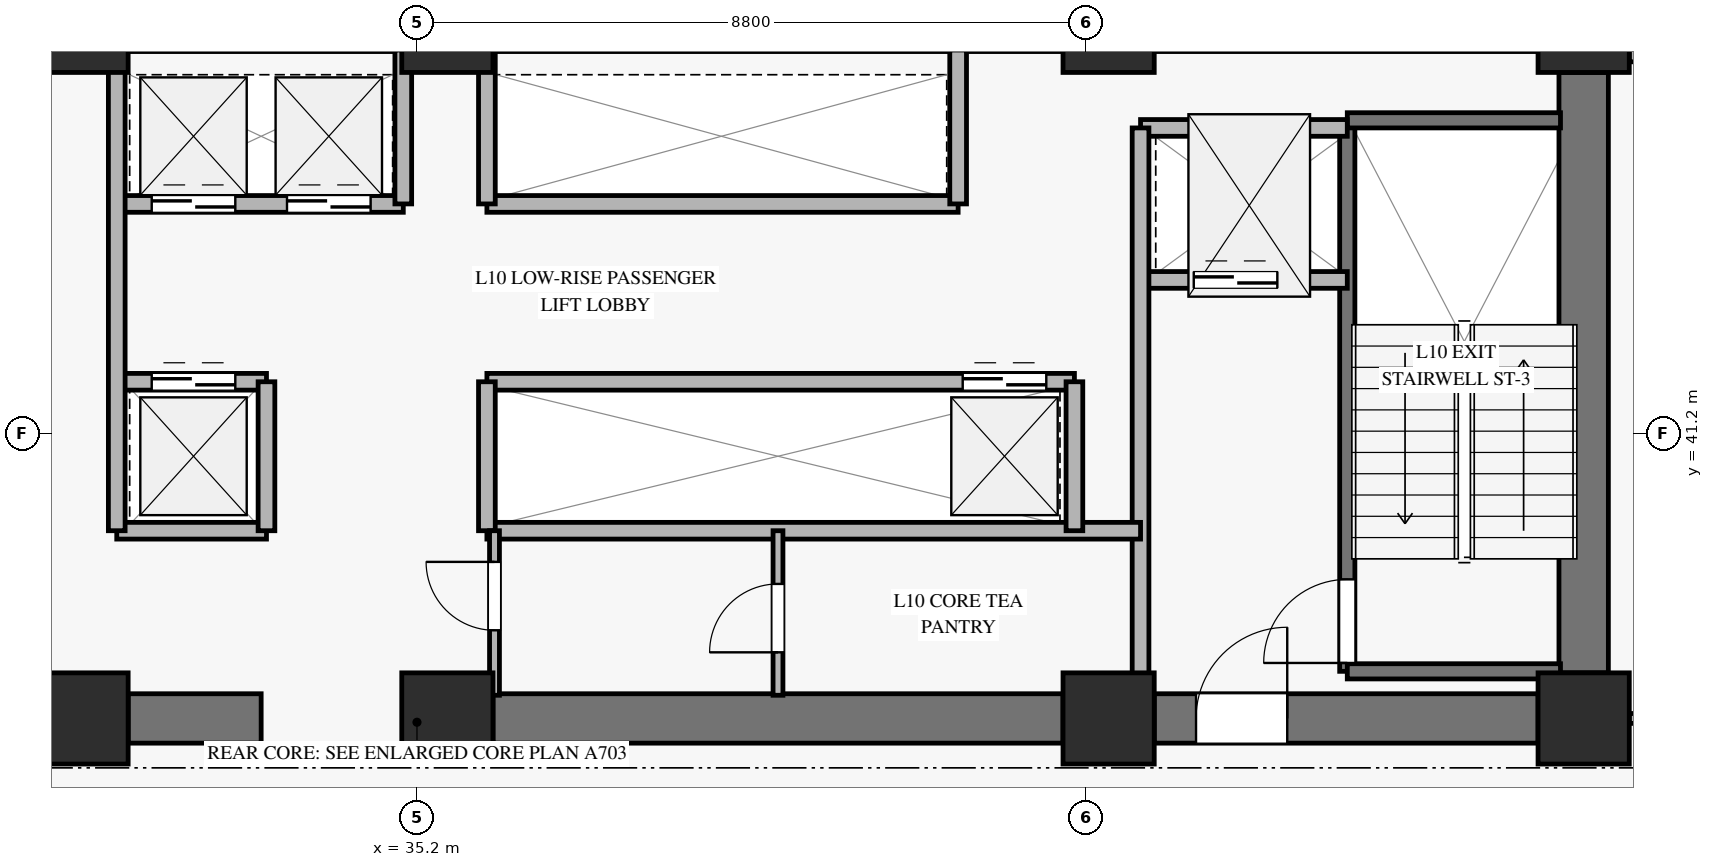
"""IFC4 building model, lengths in metres.
Left out: names, types, materials, properties, quantities, classifications, styles, units other than length and angle.
Written with IfcOpenShell. Run it as: python <this file> out.ifc"""

import sys

from ifc_helpers import new_model, si_unit, direction, frame, frame_2d, origin, origin_2d, place, context, subcontext, project, spatial, rectangle, extrude, source, transform, mapped, element, fill, save


model = new_model("IFC4")
c1 = context("Model", 3, precision=1e-05, world=origin(), true_north=direction((0.0, 1.0)))
c2 = subcontext(c1, "Body", "Model", "MODEL_VIEW")
j1 = project(units=[si_unit("LENGTHUNIT", "METRE"), si_unit("PLANEANGLEUNIT", "RADIAN")], contexts=[c1])
p1 = place(None, origin())
s1 = spatial("IfcSite", under=j1, at=p1, CompositionType="ELEMENT")
p2 = place(p1, origin())
s2 = spatial("IfcBuilding", under=s1, at=p2, CompositionType="ELEMENT")
p3 = place(p2, frame((0.0, 0.0, 41.0)))
s3 = spatial("IfcBuildingStorey", under=s2, at=p3, CompositionType="ELEMENT", Elevation=41.0)
m1 = source(origin(), c2, "Body", "SweptSolid", [
    extrude(rectangle(XDim=1.2, YDim=1.2, at=origin_2d()), origin(), (0.0, 0.0, 1.0), 3.68),
])
for number, where, z_axis, x_axis in (
    (1, (30.8, 37.45, 0.0), (0.0, 0.0, 1.0), (1.0, 0.0, 0.0)),
    (2, (30.8, 46.55, 0.0), (0.0, 0.0, 1.0), (1.0, 0.0, 0.0)),
    (3, (35.6, 37.45, 0.0), (0.0, 0.0, 1.0), (1.0, 0.0, 0.0)),
    (4, (35.6, 46.55, 0.0), (0.0, 0.0, 1.0), (1.0, 0.0, 0.0)),
    (5, (44.3, 37.45, 0.0), (0.0, 0.0, 1.0), (1.0, 0.0, 0.0)),
    (6, (44.3, 46.55, 0.0), (0.0, 0.0, 1.0), (1.0, 0.0, 0.0)),
    (7, (50.55, 37.45, 0.0), (0.0, 0.0, 1.0), (1.0, 0.0, 0.0)),
    (8, (50.55, 46.55, 0.0), (0.0, 0.0, 1.0), (1.0, 0.0, 0.0)),
):
    element("IfcColumn", number, at=place(p3, frame(where, z_axis=z_axis, x_axis=x_axis)), inside=s3, PredefinedType="PILASTER", context=c2, shape_type="MappedRepresentation", body=[
        mapped(m1, transform((0.0, 0.0, 0.0), x_axis=(1.0, 0.0, 0.0), y_axis=(0.0, 1.0, 0.0), z_axis=(0.0, 0.0, 1.0), scale=1.0)),
    ])
p4 = place(p3, frame((31.4, 37.45, 0.0), z_axis=(0.0, 0.0, 1.0), x_axis=(1.0, 0.0, 0.0)))
e9 = element("IfcWall", 9, at=p4, inside=s3, PredefinedType="SHEAR", context=c2, shape_type="SweptSolid", body=[
    extrude(rectangle(XDim=1.75, YDim=0.65, at=frame_2d((0.875, 0.0))), origin(), (0.0, 0.0, 1.0), 3.68),
])
p5 = place(p3, frame((36.2, 37.45, 0.0), z_axis=(0.0, 0.0, 1.0), x_axis=(1.0, 0.0, 0.0)))
e10 = element("IfcWall", 10, at=p5, inside=s3, PredefinedType="SHEAR", context=c2, shape_type="SweptSolid", body=[
    extrude(rectangle(XDim=7.5, YDim=0.65, at=frame_2d((3.75, 0.0))), origin(), (0.0, 0.0, 1.0), 3.68),
])
p6 = place(p3, frame((44.9, 37.45, 0.0), z_axis=(0.0, 0.0, 1.0), x_axis=(1.0, 0.0, 0.0)))
e11 = element("IfcWall", 11, at=p6, inside=s3, PredefinedType="SHEAR", context=c2, shape_type="SweptSolid", body=[
    extrude(rectangle(XDim=5.05, YDim=0.65, at=frame_2d((2.525, 0.0))), origin(), (0.0, 0.0, 1.0), 3.68),
])
p7 = place(p6, frame((0.55, 0.0, 0.0)))
e12 = element("IfcOpeningElement", 12, at=p7, cuts=e11, PredefinedType="OPENING", context=c2, shape_type="SweptSolid", body=[
    extrude(rectangle(XDim=1.2, YDim=2.15, at=frame_2d((0.6, 1.075))), frame((0.0, 0.335, 0.0), z_axis=(0.0, -1.0, 0.0), x_axis=(1.0, 0.0, 0.0)), (0.0, 0.0, 1.0), 0.67),
])
p8 = place(p3, frame((50.55, 38.05, 0.0), z_axis=(0.0, 0.0, 1.0), x_axis=(0.0, 1.0, 0.0)))
e13 = element("IfcWall", 13, at=p8, inside=s3, PredefinedType="SHEAR", context=c2, shape_type="SweptSolid", body=[
    extrude(rectangle(XDim=7.9, YDim=0.65, at=frame_2d((3.95, 0.0))), origin(), (0.0, 0.0, 1.0), 3.68),
])
p9 = place(p3, frame((51.15, 46.25, 0.0), z_axis=(0.0, 0.0, 1.0), x_axis=(1.0, 0.0, 0.0)))
e14 = element("IfcWall", 14, at=p9, inside=s3, PredefinedType="SOLIDWALL", context=c2, shape_type="SweptSolid", body=[
    extrude(rectangle(XDim=12.191, YDim=0.32, at=frame_2d((6.096, 0.0))), origin(), (0.0, 0.0, 1.0), 3.16),
])
p10 = place(p9, frame((5.296, 0.0, 0.45)))
e15 = element("IfcOpeningElement", 15, at=p10, cuts=e14, PredefinedType="OPENING", context=c2, shape_type="SweptSolid", body=[
    extrude(rectangle(XDim=1.6, YDim=2.0, at=frame_2d((0.8, 1.0))), frame((0.0, 0.17, 0.0), z_axis=(0.0, -1.0, 0.0), x_axis=(1.0, 0.0, 0.0)), (0.0, 0.0, 1.0), 0.34),
])
p11 = place(p3, frame((47.44, 38.07, 0.0), z_axis=(0.0, 0.0, 1.0), x_axis=(0.0, 1.0, 0.0)))
e16 = element("IfcWall", 16, at=p11, inside=s3, PredefinedType="SOLIDWALL", context=c2, shape_type="SweptSolid", body=[
    extrude(rectangle(XDim=7.25, YDim=0.2, at=frame_2d((3.625, 0.0))), origin(), (0.0, 0.0, 1.0), 3.9),
])
p12 = place(p11, frame((0.11, 0.0, 0.0)))
e17 = element("IfcOpeningElement", 17, at=p12, cuts=e16, PredefinedType="OPENING", context=c2, shape_type="SweptSolid", body=[
    extrude(rectangle(XDim=1.1, YDim=2.15, at=frame_2d((0.55, 1.075))), frame((0.0, 0.11, 0.0), z_axis=(0.0, -1.0, 0.0), x_axis=(1.0, 0.0, 0.0)), (0.0, 0.0, 1.0), 0.22),
])
for number, where, z_axis, x_axis in (
    (18, (47.44, 45.32, 0.0), (0.0, 0.0, 1.0), (1.0, 0.0, 0.0)),
    (19, (47.44, 38.07, 0.0), (0.0, 0.0, 1.0), (1.0, 0.0, 0.0)),
):
    element("IfcWall", number, at=place(p3, frame(where, z_axis=z_axis, x_axis=x_axis)), inside=s3, PredefinedType="SOLIDWALL", context=c2, shape_type="SweptSolid", body=[
        extrude(rectangle(XDim=2.805, YDim=0.2, at=frame_2d((1.403, 0.0))), origin(), (0.0, 0.0, 1.0), 3.9),
    ])
p13 = place(p3, frame((44.72, 43.22, 0.0), z_axis=(0.0, 0.0, 1.0), x_axis=(1.0, 0.0, 0.0)))
e20 = element("IfcWall", 20, at=p13, inside=s3, PredefinedType="SOLIDWALL", context=c2, shape_type="SweptSolid", body=[
    extrude(rectangle(XDim=2.72, YDim=0.22, at=frame_2d((1.36, 0.0))), origin(), (0.0, 0.0, 1.0), 3.68),
])
p14 = place(p13, frame((0.7, 0.0, 0.0)))
e21 = element("IfcOpeningElement", 21, at=p14, cuts=e20, PredefinedType="OPENING", context=c2, shape_type="SweptSolid", body=[
    extrude(rectangle(XDim=1.1, YDim=2.2, at=frame_2d((0.55, 1.1))), frame((0.0, 0.12, 0.0), z_axis=(0.0, -1.0, 0.0), x_axis=(1.0, 0.0, 0.0)), (0.0, 0.0, 1.0), 0.24),
])
p15 = place(p3, frame((44.72, 45.22, 0.0), z_axis=(0.0, 0.0, 1.0), x_axis=(1.0, 0.0, 0.0)))
e22 = element("IfcWall", 22, at=p15, inside=s3, PredefinedType="SOLIDWALL", context=c2, shape_type="SweptSolid", body=[
    extrude(rectangle(XDim=2.72, YDim=0.22, at=frame_2d((1.36, 0.0))), origin(), (0.0, 0.0, 1.0), 3.68),
])
p16 = place(p3, frame((44.72, 37.755, 0.0), z_axis=(0.0, 0.0, 1.0), x_axis=(0.0, 1.0, 0.0)))
e23 = element("IfcWall", 23, at=p16, inside=s3, PredefinedType="SOLIDWALL", context=c2, shape_type="SweptSolid", body=[
    extrude(rectangle(XDim=7.465, YDim=0.22, at=frame_2d((3.732, 0.0))), origin(), (0.0, 0.0, 1.0), 3.68),
])
p17 = place(p3, frame((31.25, 44.22, 0.0), z_axis=(0.0, 0.0, 1.0), x_axis=(1.0, 0.0, 0.0)))
e24 = element("IfcWall", 24, at=p17, inside=s3, PredefinedType="SOLIDWALL", context=c2, shape_type="SweptSolid", body=[
    extrude(rectangle(XDim=3.77, YDim=0.22, at=frame_2d((1.885, 0.0))), origin(), (0.0, 0.0, 1.0), 3.68),
])
p18 = place(p17, frame((0.46, 0.0, 0.0)))
e25 = element("IfcOpeningElement", 25, at=p18, cuts=e24, PredefinedType="OPENING", context=c2, shape_type="SweptSolid", body=[
    extrude(rectangle(XDim=1.1, YDim=2.2, at=frame_2d((0.55, 1.1))), frame((0.0, 0.12, 0.0), z_axis=(0.0, -1.0, 0.0), x_axis=(1.0, 0.0, 0.0)), (0.0, 0.0, 1.0), 0.24),
])
p19 = place(p17, frame((2.24, 0.0, 0.0)))
e26 = element("IfcOpeningElement", 26, at=p19, cuts=e24, PredefinedType="OPENING", context=c2, shape_type="SweptSolid", body=[
    extrude(rectangle(XDim=1.1, YDim=2.2, at=frame_2d((0.55, 1.1))), frame((0.0, 0.12, 0.0), z_axis=(0.0, -1.0, 0.0), x_axis=(1.0, 0.0, 0.0)), (0.0, 0.0, 1.0), 0.24),
])
p20 = place(p3, frame((36.12, 44.22, 0.0), z_axis=(0.0, 0.0, 1.0), x_axis=(1.0, 0.0, 0.0)))
e27 = element("IfcWall", 27, at=p20, inside=s3, PredefinedType="SOLIDWALL", context=c2, shape_type="SweptSolid", body=[
    extrude(rectangle(XDim=6.2, YDim=0.22, at=frame_2d((3.1, 0.0))), origin(), (0.0, 0.0, 1.0), 3.68),
])
for number, where, z_axis, x_axis in (
    (28, (35.02, 44.22, 0.0), (0.0, 0.0, 1.0), (0.0, 1.0, 0.0)),
    (29, (36.12, 44.22, 0.0), (0.0, 0.0, 1.0), (0.0, 1.0, 0.0)),
    (30, (42.32, 44.22, 0.0), (0.0, 0.0, 1.0), (0.0, 1.0, 0.0)),
):
    element("IfcWall", number, at=place(p3, frame(where, z_axis=z_axis, x_axis=x_axis)), inside=s3, PredefinedType="SOLIDWALL", context=c2, shape_type="SweptSolid", body=[
        extrude(rectangle(XDim=2.025, YDim=0.22, at=frame_2d((1.013, 0.0))), origin(), (0.0, 0.0, 1.0), 3.68),
    ])
p21 = place(p3, frame((31.25, 41.88, 0.0), z_axis=(0.0, 0.0, 1.0), x_axis=(1.0, 0.0, 0.0)))
e31 = element("IfcWall", 31, at=p21, inside=s3, PredefinedType="SOLIDWALL", context=c2, shape_type="SweptSolid", body=[
    extrude(rectangle(XDim=1.97, YDim=0.22, at=frame_2d((0.985, 0.0))), origin(), (0.0, 0.0, 1.0), 3.68),
])
p22 = place(p21, frame((0.46, 0.0, 0.0)))
e32 = element("IfcOpeningElement", 32, at=p22, cuts=e31, PredefinedType="OPENING", context=c2, shape_type="SweptSolid", body=[
    extrude(rectangle(XDim=1.1, YDim=2.2, at=frame_2d((0.55, 1.1))), frame((0.0, 0.12, 0.0), z_axis=(0.0, -1.0, 0.0), x_axis=(1.0, 0.0, 0.0)), (0.0, 0.0, 1.0), 0.24),
])
p23 = place(p3, frame((36.12, 41.88, 0.0), z_axis=(0.0, 0.0, 1.0), x_axis=(1.0, 0.0, 0.0)))
e33 = element("IfcWall", 33, at=p23, inside=s3, PredefinedType="SOLIDWALL", context=c2, shape_type="SweptSolid", body=[
    extrude(rectangle(XDim=7.73, YDim=0.22, at=frame_2d((3.865, 0.0))), origin(), (0.0, 0.0, 1.0), 3.68),
])
p24 = place(p23, frame((6.26, 0.0, 0.0)))
e34 = element("IfcOpeningElement", 34, at=p24, cuts=e33, PredefinedType="OPENING", context=c2, shape_type="SweptSolid", body=[
    extrude(rectangle(XDim=1.1, YDim=2.2, at=frame_2d((0.55, 1.1))), frame((0.0, 0.12, 0.0), z_axis=(0.0, -1.0, 0.0), x_axis=(1.0, 0.0, 0.0)), (0.0, 0.0, 1.0), 0.24),
])
p25 = place(p3, frame((31.25, 39.92, 0.0), z_axis=(0.0, 0.0, 1.0), x_axis=(1.0, 0.0, 0.0)))
e35 = element("IfcWall", 35, at=p25, inside=s3, PredefinedType="SOLIDWALL", context=c2, shape_type="SweptSolid", body=[
    extrude(rectangle(XDim=1.97, YDim=0.22, at=frame_2d((0.985, 0.0))), origin(), (0.0, 0.0, 1.0), 3.68),
])
p26 = place(p3, frame((33.22, 39.92, 0.0), z_axis=(0.0, 0.0, 1.0), x_axis=(0.0, 1.0, 0.0)))
e36 = element("IfcWall", 36, at=p26, inside=s3, PredefinedType="SOLIDWALL", context=c2, shape_type="SweptSolid", body=[
    extrude(rectangle(XDim=1.96, YDim=0.22, at=frame_2d((0.98, 0.0))), origin(), (0.0, 0.0, 1.0), 3.68),
])
p27 = place(p3, frame((36.12, 39.92, 0.0), z_axis=(0.0, 0.0, 1.0), x_axis=(1.0, 0.0, 0.0)))
e37 = element("IfcWall", 37, at=p27, inside=s3, PredefinedType="SOLIDWALL", context=c2, shape_type="SweptSolid", body=[
    extrude(rectangle(XDim=8.6, YDim=0.22, at=frame_2d((4.3, 0.0))), origin(), (0.0, 0.0, 1.0), 2.965),
])
p28 = place(p3, frame((36.12, 39.92, 0.0), z_axis=(0.0, 0.0, 1.0), x_axis=(0.0, 1.0, 0.0)))
e38 = element("IfcWall", 38, at=p28, inside=s3, PredefinedType="SOLIDWALL", context=c2, shape_type="SweptSolid", body=[
    extrude(rectangle(XDim=1.96, YDim=0.22, at=frame_2d((0.98, 0.0))), origin(), (0.0, 0.0, 1.0), 3.68),
])
p29 = place(p3, frame((31.25, 39.92, 0.0), z_axis=(0.0, 0.0, 1.0), x_axis=(0.0, 1.0, 0.0)))
e39 = element("IfcWall", 39, at=p29, inside=s3, PredefinedType="SOLIDWALL", context=c2, shape_type="SweptSolid", body=[
    extrude(rectangle(XDim=6.325, YDim=0.22, at=frame_2d((3.163, 0.0))), origin(), (0.0, 0.0, 1.0), 3.68),
])
p30 = place(p3, frame((43.85, 39.92, 0.0), z_axis=(0.0, 0.0, 1.0), x_axis=(0.0, 1.0, 0.0)))
e40 = element("IfcWall", 40, at=p30, inside=s3, PredefinedType="SOLIDWALL", context=c2, shape_type="SweptSolid", body=[
    extrude(rectangle(XDim=1.96, YDim=0.22, at=frame_2d((0.98, 0.0))), origin(), (0.0, 0.0, 1.0), 3.68),
])
p31 = place(p3, frame((36.22, 37.755, 0.0), z_axis=(0.0, 0.0, 1.0), x_axis=(0.0, 1.0, 0.0)))
e41 = element("IfcWall", 41, at=p31, inside=s3, PredefinedType="PARTITIONING", context=c2, shape_type="SweptSolid", body=[
    extrude(rectangle(XDim=2.165, YDim=0.13, at=frame_2d((1.083, 0.0))), origin(), (0.0, 0.0, 1.0), 3.68),
])
p32 = place(p31, frame((0.855, 0.0, 0.0)))
e42 = element("IfcOpeningElement", 42, at=p32, cuts=e41, PredefinedType="OPENING", context=c2, shape_type="SweptSolid", body=[
    extrude(rectangle(XDim=0.9, YDim=2.1, at=frame_2d((0.45, 1.05))), frame((0.0, 0.075, 0.0), z_axis=(0.0, -1.0, 0.0), x_axis=(1.0, 0.0, 0.0)), (0.0, 0.0, 1.0), 0.15),
])
p33 = place(p3, frame((39.95, 37.755, 0.0), z_axis=(0.0, 0.0, 1.0), x_axis=(0.0, 1.0, 0.0)))
e43 = element("IfcWall", 43, at=p33, inside=s3, PredefinedType="PARTITIONING", context=c2, shape_type="SweptSolid", body=[
    extrude(rectangle(XDim=2.165, YDim=0.13, at=frame_2d((1.083, 0.0))), origin(), (0.0, 0.0, 1.0), 3.68),
])
p34 = place(p33, frame((0.565, 0.0, 0.0)))
e44 = element("IfcOpeningElement", 44, at=p34, cuts=e43, PredefinedType="OPENING", context=c2, shape_type="SweptSolid", body=[
    extrude(rectangle(XDim=0.9, YDim=2.1, at=frame_2d((0.45, 1.05))), frame((0.0, 0.075, 0.0), z_axis=(0.0, -1.0, 0.0), x_axis=(1.0, 0.0, 0.0)), (0.0, 0.0, 1.0), 0.15),
])
p35 = place(p3, frame((51.15, 37.45, 0.0), z_axis=(0.0, 0.0, 1.0), x_axis=(1.0, 0.0, 0.0)))
e45 = element("IfcWall", 45, at=p35, inside=s3, PredefinedType="PARTITIONING", context=c2, shape_type="SweptSolid", body=[
    extrude(rectangle(XDim=15.915, YDim=0.13, at=frame_2d((7.958, 0.0))), origin(), (0.0, 0.0, 1.0), 3.165),
])
p36 = place(p35, frame((0.5, 0.0, 0.0)))
e46 = element("IfcOpeningElement", 46, at=p36, cuts=e45, PredefinedType="OPENING", context=c2, shape_type="SweptSolid", body=[
    extrude(rectangle(XDim=0.9, YDim=2.1, at=frame_2d((0.45, 1.05))), frame((0.0, 0.075, 0.0), z_axis=(0.0, -1.0, 0.0), x_axis=(1.0, 0.0, 0.0)), (0.0, 0.0, 1.0), 0.15),
])
p37 = place(p35, frame((11.58, 0.0, 0.0)))
e47 = element("IfcOpeningElement", 47, at=p37, cuts=e45, PredefinedType="OPENING", context=c2, shape_type="SweptSolid", body=[
    extrude(rectangle(XDim=0.95, YDim=2.1, at=frame_2d((0.475, 1.05))), frame((0.0, 0.075, 0.0), z_axis=(0.0, -1.0, 0.0), x_axis=(1.0, 0.0, 0.0)), (0.0, 0.0, 1.0), 0.15),
])
m2 = source(origin(), c2, "Body", "SweptSolid", [
    extrude(rectangle(XDim=1.1, YDim=2.15, at=frame_2d((0.55, 1.075))), frame((0.0, 0.025, 0.0), z_axis=(0.0, -1.0, 0.0), x_axis=(1.0, 0.0, 0.0)), (0.0, 0.0, 1.0), 0.05),
])
p38 = place(p12, origin())
e48 = element("IfcDoor", 48, at=p38, inside=s3, OperationType="SINGLE_SWING_LEFT", PredefinedType="DOOR", context=c2, shape_type="MappedRepresentation", body=[
    mapped(m2, transform((0.0, 0.0, 0.0), x_axis=(1.0, 0.0, 0.0), y_axis=(0.0, 1.0, 0.0), z_axis=(0.0, 0.0, 1.0), scale=1.0)),
])
fill(e17, e48)
m3 = source(origin(), c2, "Body", "SweptSolid", [
    extrude(rectangle(XDim=1.1, YDim=2.2, at=frame_2d((0.55, 1.1))), frame((0.0, 0.025, 0.0), z_axis=(0.0, -1.0, 0.0), x_axis=(1.0, 0.0, 0.0)), (0.0, 0.0, 1.0), 0.05),
])
p39 = place(p14, origin())
e49 = element("IfcDoor", 49, at=p39, inside=s3, OperationType="SLIDING_TO_LEFT", PredefinedType="DOOR", context=c2, shape_type="MappedRepresentation", body=[
    mapped(m3, transform((0.0, 0.0, 0.0), x_axis=(1.0, 0.0, 0.0), y_axis=(0.0, 1.0, 0.0), z_axis=(0.0, 0.0, 1.0), scale=1.0)),
])
fill(e21, e49)
m4 = source(origin(), c2, "Body", "SweptSolid", [
    extrude(rectangle(XDim=1.2, YDim=2.15, at=frame_2d((0.6, 1.075))), frame((0.0, 0.025, 0.0), z_axis=(0.0, -1.0, 0.0), x_axis=(1.0, 0.0, 0.0)), (0.0, 0.0, 1.0), 0.05),
])
p40 = place(p7, origin())
e50 = element("IfcDoor", 50, at=p40, inside=s3, OperationType="SINGLE_SWING_RIGHT", PredefinedType="DOOR", context=c2, shape_type="MappedRepresentation", body=[
    mapped(m4, transform((0.0, 0.0, 0.0), x_axis=(1.0, 0.0, 0.0), y_axis=(0.0, 1.0, 0.0), z_axis=(0.0, 0.0, 1.0), scale=1.0)),
])
fill(e12, e50)
p41 = place(p18, origin())
e51 = element("IfcDoor", 51, at=p41, inside=s3, OperationType="SLIDING_TO_LEFT", PredefinedType="DOOR", context=c2, shape_type="MappedRepresentation", body=[
    mapped(m3, transform((0.0, 0.0, 0.0), x_axis=(1.0, 0.0, 0.0), y_axis=(0.0, 1.0, 0.0), z_axis=(0.0, 0.0, 1.0), scale=1.0)),
])
fill(e25, e51)
p42 = place(p19, origin())
e52 = element("IfcDoor", 52, at=p42, inside=s3, OperationType="SLIDING_TO_LEFT", PredefinedType="DOOR", context=c2, shape_type="MappedRepresentation", body=[
    mapped(m3, transform((0.0, 0.0, 0.0), x_axis=(1.0, 0.0, 0.0), y_axis=(0.0, 1.0, 0.0), z_axis=(0.0, 0.0, 1.0), scale=1.0)),
])
fill(e26, e52)
p43 = place(p22, origin())
e53 = element("IfcDoor", 53, at=p43, inside=s3, OperationType="SLIDING_TO_LEFT", PredefinedType="DOOR", context=c2, shape_type="MappedRepresentation", body=[
    mapped(m3, transform((0.0, 0.0, 0.0), x_axis=(1.0, 0.0, 0.0), y_axis=(0.0, 1.0, 0.0), z_axis=(0.0, 0.0, 1.0), scale=1.0)),
])
fill(e32, e53)
p44 = place(p24, origin())
e54 = element("IfcDoor", 54, at=p44, inside=s3, OperationType="SLIDING_TO_LEFT", PredefinedType="DOOR", context=c2, shape_type="MappedRepresentation", body=[
    mapped(m3, transform((0.0, 0.0, 0.0), x_axis=(1.0, 0.0, 0.0), y_axis=(0.0, 1.0, 0.0), z_axis=(0.0, 0.0, 1.0), scale=1.0)),
])
fill(e34, e54)
m5 = source(origin(), c2, "Body", "SweptSolid", [
    extrude(rectangle(XDim=0.9, YDim=2.1, at=frame_2d((0.45, 1.05))), frame((0.0, 0.025, 0.0), z_axis=(0.0, -1.0, 0.0), x_axis=(1.0, 0.0, 0.0)), (0.0, 0.0, 1.0), 0.05),
])
p45 = place(p32, origin())
e55 = element("IfcDoor", 55, at=p45, inside=s3, OperationType="SINGLE_SWING_RIGHT", PredefinedType="DOOR", context=c2, shape_type="MappedRepresentation", body=[
    mapped(m5, transform((0.0, 0.0, 0.0), x_axis=(1.0, 0.0, 0.0), y_axis=(0.0, 1.0, 0.0), z_axis=(0.0, 0.0, 1.0), scale=1.0)),
])
fill(e42, e55)
p46 = place(p34, origin())
e56 = element("IfcDoor", 56, at=p46, inside=s3, OperationType="SINGLE_SWING_LEFT", PredefinedType="DOOR", context=c2, shape_type="MappedRepresentation", body=[
    mapped(m5, transform((0.0, 0.0, 0.0), x_axis=(1.0, 0.0, 0.0), y_axis=(0.0, 1.0, 0.0), z_axis=(0.0, 0.0, 1.0), scale=1.0)),
])
fill(e44, e56)
save(model, sys.argv[1])
